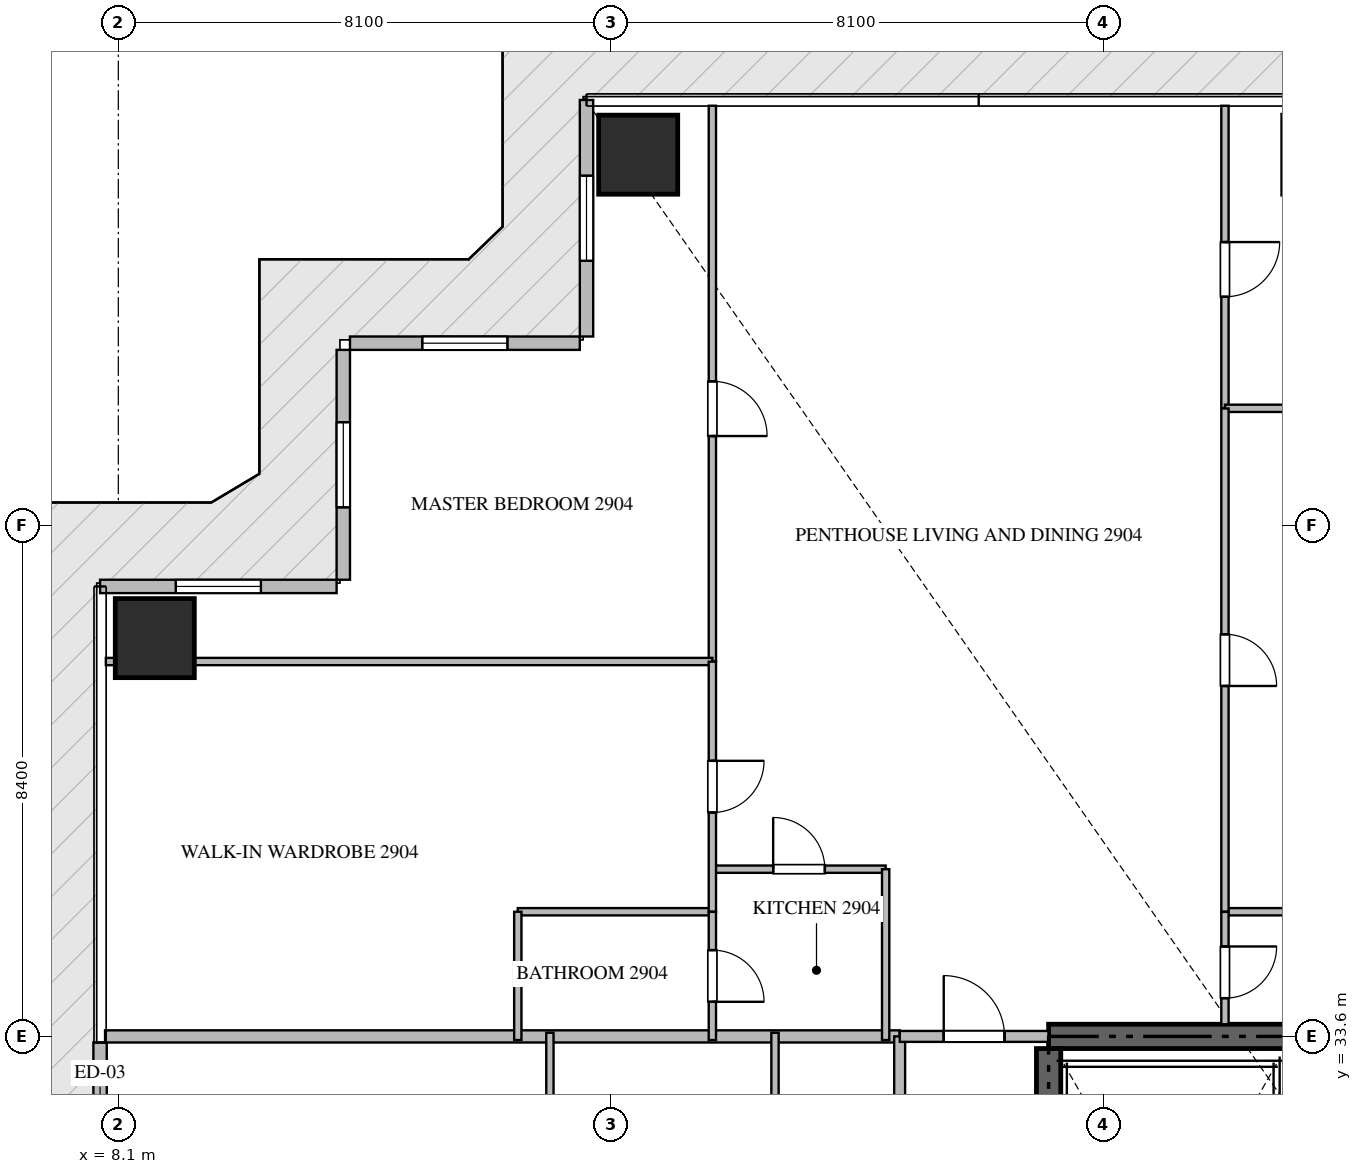
"""IFC4 building model, lengths in metres.
Left out: names, types, materials, properties, quantities, classifications, styles, units other than length and angle.
Written with IfcOpenShell. Run it as: python <this file> out.ifc"""

import sys

from ifc_helpers import new_model, si_unit, direction, frame, frame_2d, origin, origin_2d, place, context, subcontext, project, spatial, rectangle, extrude, source, transform, mapped, element, fill, save


model = new_model("IFC4")
c1 = context("Model", 3, precision=1e-05, world=origin(), true_north=direction((0.0, 1.0)))
c2 = subcontext(c1, "Body", "Model", "MODEL_VIEW")
j1 = project(units=[si_unit("LENGTHUNIT", "METRE"), si_unit("PLANEANGLEUNIT", "RADIAN")], contexts=[c1])
p1 = place(None, origin())
s1 = spatial("IfcSite", under=j1, at=p1, CompositionType="ELEMENT")
p2 = place(p1, origin())
s2 = spatial("IfcBuilding", under=s1, at=p2, CompositionType="ELEMENT")
p3 = place(p2, frame((0.0, 0.0, 120.15)))
s3 = spatial("IfcBuildingStorey", under=s2, at=p3, CompositionType="ELEMENT", Elevation=120.15)
p4 = place(p3, frame((41.4, 33.6, -0.44), z_axis=(0.0, 0.0, 1.0), x_axis=(-1.0, 0.0, 0.0)))
e1 = element("IfcWall", 1, at=p4, inside=s3, PredefinedType="SHEAR", context=c2, shape_type="SweptSolid", body=[
    extrude(rectangle(XDim=18.0, YDim=0.4, at=frame_2d((9.0, 0.0))), origin(), (0.0, 0.0, 1.0), 3.928),
])
p5 = place(p3, frame((23.4, 24.25, -0.44), z_axis=(0.0, 0.0, 1.0), x_axis=(0.0, 1.0, 0.0)))
e2 = element("IfcWall", 2, at=p5, inside=s3, PredefinedType="SHEAR", context=c2, shape_type="SweptSolid", body=[
    extrude(rectangle(XDim=9.15, YDim=0.4, at=frame_2d((4.575, 0.0))), origin(), (0.0, 0.0, 1.0), 3.928),
])
m1 = source(origin(), c2, "Body", "SweptSolid", [
    extrude(rectangle(XDim=1.3, YDim=1.3, at=origin_2d()), origin(), (0.0, 0.0, 1.0), 3.93),
])
for number, where, z_axis, x_axis in (
    (3, (16.65, 48.1, -0.44), (0.0, 0.0, 1.0), (1.0, 0.0, 0.0)),
    (4, (8.7, 40.15, -0.44), (0.0, 0.0, 1.0), (1.0, 0.0, 0.0)),
):
    element("IfcColumn", number, at=place(p3, frame(where, z_axis=z_axis, x_axis=x_axis)), inside=s3, PredefinedType="COLUMN", context=c2, shape_type="MappedRepresentation", body=[
        mapped(m1, transform((0.0, 0.0, 0.0), scale=1.0)),
    ])
p6 = place(p3, frame((15.8, 49.0, 0.0), z_axis=(0.0, 0.0, 1.0), x_axis=(0.0, -1.0, 0.0)))
e5 = element("IfcWall", 5, at=p6, inside=s3, PredefinedType="ELEMENTEDWALL", context=c2, shape_type="SweptSolid", body=[
    extrude(rectangle(XDim=3.89, YDim=0.22, at=frame_2d((1.945, 0.0))), origin(), (0.0, 0.0, 1.0), 3.475),
])
p7 = place(p6, frame((1.245, 0.0, 0.65)))
e6 = element("IfcOpeningElement", 6, at=p7, cuts=e5, PredefinedType="OPENING", context=c2, shape_type="SweptSolid", body=[
    extrude(rectangle(XDim=1.4, YDim=2.05, at=frame_2d((0.7, 1.025))), frame((0.0, 0.12, 0.0), z_axis=(0.0, -1.0, 0.0), x_axis=(1.0, 0.0, 0.0)), (0.0, 0.0, 1.0), 0.24),
])
p8 = place(p3, frame((15.69, 45.0, 0.0), z_axis=(0.0, 0.0, 1.0), x_axis=(-1.0, 0.0, 0.0)))
e7 = element("IfcWall", 7, at=p8, inside=s3, PredefinedType="ELEMENTEDWALL", context=c2, shape_type="SweptSolid", body=[
    extrude(rectangle(XDim=3.78, YDim=0.22, at=frame_2d((1.89, 0.0))), origin(), (0.0, 0.0, 1.0), 3.475),
])
p9 = place(p8, frame((1.19, 0.0, 0.65)))
e8 = element("IfcOpeningElement", 8, at=p9, cuts=e7, PredefinedType="OPENING", context=c2, shape_type="SweptSolid", body=[
    extrude(rectangle(XDim=1.4, YDim=2.05, at=frame_2d((0.7, 1.025))), frame((0.0, 0.12, 0.0), z_axis=(0.0, -1.0, 0.0), x_axis=(1.0, 0.0, 0.0)), (0.0, 0.0, 1.0), 0.24),
])
p10 = place(p3, frame((11.8, 44.89, 0.0), z_axis=(0.0, 0.0, 1.0), x_axis=(0.0, -1.0, 0.0)))
e9 = element("IfcWall", 9, at=p10, inside=s3, PredefinedType="ELEMENTEDWALL", context=c2, shape_type="SweptSolid", body=[
    extrude(rectangle(XDim=3.78, YDim=0.22, at=frame_2d((1.89, 0.0))), origin(), (0.0, 0.0, 1.0), 3.475),
])
p11 = place(p10, frame((1.19, 0.0, 0.65)))
e10 = element("IfcOpeningElement", 10, at=p11, cuts=e9, PredefinedType="OPENING", context=c2, shape_type="SweptSolid", body=[
    extrude(rectangle(XDim=1.4, YDim=2.05, at=frame_2d((0.7, 1.025))), frame((0.0, 0.12, 0.0), z_axis=(0.0, -1.0, 0.0), x_axis=(1.0, 0.0, 0.0)), (0.0, 0.0, 1.0), 0.24),
])
p12 = place(p3, frame((11.69, 41.0, 0.0), z_axis=(0.0, 0.0, 1.0), x_axis=(-1.0, 0.0, 0.0)))
e11 = element("IfcWall", 11, at=p12, inside=s3, PredefinedType="ELEMENTEDWALL", context=c2, shape_type="SweptSolid", body=[
    extrude(rectangle(XDim=3.89, YDim=0.22, at=frame_2d((1.945, 0.0))), origin(), (0.0, 0.0, 1.0), 3.475),
])
p13 = place(p12, frame((1.245, 0.0, 0.65)))
e12 = element("IfcOpeningElement", 12, at=p13, cuts=e11, PredefinedType="OPENING", context=c2, shape_type="SweptSolid", body=[
    extrude(rectangle(XDim=1.4, YDim=2.05, at=frame_2d((0.7, 1.025))), frame((0.0, 0.12, 0.0), z_axis=(0.0, -1.0, 0.0), x_axis=(1.0, 0.0, 0.0)), (0.0, 0.0, 1.0), 0.24),
])
p14 = place(p3, frame((7.8, 33.5, 0.0), z_axis=(0.0, 0.0, 1.0), x_axis=(0.0, -1.0, 0.0)))
e13 = element("IfcWall", 13, at=p14, inside=s3, PredefinedType="ELEMENTEDWALL", context=c2, shape_type="SweptSolid", body=[
    extrude(rectangle(XDim=3.0, YDim=0.22, at=frame_2d((1.5, 0.0))), origin(), (0.0, 0.0, 1.0), 3.475),
])
p15 = place(p14, frame((0.95, 0.0, 0.0)))
e14 = element("IfcOpeningElement", 14, at=p15, cuts=e13, PredefinedType="OPENING", context=c2, shape_type="SweptSolid", body=[
    extrude(rectangle(XDim=1.1, YDim=2.2, at=frame_2d((0.55, 1.1))), frame((0.0, 0.12, 0.0), z_axis=(0.0, -1.0, 0.0), x_axis=(1.0, 0.0, 0.0)), (0.0, 0.0, 1.0), 0.24),
])
p16 = place(p3, frame((7.882, 33.6, 0.0), z_axis=(0.0, 0.0, 1.0), x_axis=(1.0, 0.0, 0.0)))
e15 = element("IfcWall", 15, at=p16, inside=s3, PredefinedType="PARTITIONING", context=c2, shape_type="SweptSolid", body=[
    extrude(rectangle(XDim=13.068, YDim=0.2, at=frame_2d((6.534, 0.0))), origin(), (0.0, 0.0, 1.0), 3.49),
])
p17 = place(p3, frame((20.95, 14.9, 0.0), z_axis=(0.0, 0.0, 1.0), x_axis=(0.0, 1.0, 0.0)))
e16 = element("IfcWall", 16, at=p17, inside=s3, PredefinedType="PARTITIONING", context=c2, shape_type="SweptSolid", body=[
    extrude(rectangle(XDim=18.7, YDim=0.18, at=frame_2d((9.35, 0.0))), origin(), (0.0, 0.0, 1.0), 3.49),
])
p18 = place(p17, frame((1.805, 0.0, 0.0)))
e17 = element("IfcOpeningElement", 17, at=p18, cuts=e16, PredefinedType="OPENING", context=c2, shape_type="SweptSolid", body=[
    extrude(rectangle(XDim=1.0, YDim=2.15, at=frame_2d((0.5, 1.075))), frame((0.0, 0.1, 0.0), z_axis=(0.0, -1.0, 0.0), x_axis=(1.0, 0.0, 0.0)), (0.0, 0.0, 1.0), 0.2),
])
p19 = place(p17, frame((10.602, 0.0, 0.0)))
e18 = element("IfcOpeningElement", 18, at=p19, cuts=e16, PredefinedType="OPENING", context=c2, shape_type="SweptSolid", body=[
    extrude(rectangle(XDim=1.0, YDim=2.15, at=frame_2d((0.5, 1.075))), frame((0.0, 0.1, 0.0), z_axis=(0.0, -1.0, 0.0), x_axis=(1.0, 0.0, 0.0)), (0.0, 0.0, 1.0), 0.2),
])
p20 = place(p3, frame((20.952, 33.6, 0.0), z_axis=(0.0, 0.0, 1.0), x_axis=(1.0, 0.0, 0.0)))
e19 = element("IfcWall", 19, at=p20, inside=s3, PredefinedType="PARTITIONING", context=c2, shape_type="SweptSolid", body=[
    extrude(rectangle(XDim=2.446, YDim=0.18, at=frame_2d((1.223, 0.0))), origin(), (0.0, 0.0, 1.0), 3.49),
])
p21 = place(p20, frame((0.723, 0.0, 0.0)))
e20 = element("IfcOpeningElement", 20, at=p21, cuts=e19, PredefinedType="OPENING", context=c2, shape_type="SweptSolid", body=[
    extrude(rectangle(XDim=1.0, YDim=2.15, at=frame_2d((0.5, 1.075))), frame((0.0, 0.1, 0.0), z_axis=(0.0, -1.0, 0.0), x_axis=(1.0, 0.0, 0.0)), (0.0, 0.0, 1.0), 0.2),
])
p22 = place(p3, frame((17.87, 36.35, 0.0), z_axis=(0.0, 0.0, 1.0), x_axis=(1.0, 0.0, 0.0)))
e21 = element("IfcWall", 21, at=p22, inside=s3, PredefinedType="PARTITIONING", context=c2, shape_type="SweptSolid", body=[
    extrude(rectangle(XDim=2.85, YDim=0.12, at=frame_2d((1.425, 0.0))), origin(), (0.0, 0.0, 1.0), 3.49),
])
p23 = place(p22, frame((1.0, 0.0, 0.0)))
e22 = element("IfcOpeningElement", 22, at=p23, cuts=e21, PredefinedType="OPENING", context=c2, shape_type="SweptSolid", body=[
    extrude(rectangle(XDim=0.85, YDim=2.1, at=frame_2d((0.425, 1.05))), frame((0.0, 0.07, 0.0), z_axis=(0.0, -1.0, 0.0), x_axis=(1.0, 0.0, 0.0)), (0.0, 0.0, 1.0), 0.14),
])
p24 = place(p3, frame((20.72, 36.35, 0.0), z_axis=(0.0, 0.0, 1.0), x_axis=(0.0, -1.0, 0.0)))
e23 = element("IfcWall", 23, at=p24, inside=s3, PredefinedType="PARTITIONING", context=c2, shape_type="SweptSolid", body=[
    extrude(rectangle(XDim=2.81, YDim=0.12, at=frame_2d((1.405, 0.0))), origin(), (0.0, 0.0, 1.0), 3.49),
])
p25 = place(p3, frame((17.87, 48.905, 0.0), z_axis=(0.0, 0.0, 1.0), x_axis=(0.0, -1.0, 0.0)))
e24 = element("IfcWall", 24, at=p25, inside=s3, PredefinedType="PARTITIONING", context=c2, shape_type="SweptSolid", body=[
    extrude(rectangle(XDim=9.14, YDim=0.12, at=frame_2d((4.57, 0.0))), origin(), (0.0, 0.0, 1.0), 3.49),
])
p26 = place(p25, frame((4.532, 0.0, 0.0)))
e25 = element("IfcOpeningElement", 25, at=p26, cuts=e24, PredefinedType="OPENING", context=c2, shape_type="SweptSolid", body=[
    extrude(rectangle(XDim=0.9, YDim=2.1, at=frame_2d((0.45, 1.05))), frame((0.0, 0.07, 0.0), z_axis=(0.0, -1.0, 0.0), x_axis=(1.0, 0.0, 0.0)), (0.0, 0.0, 1.0), 0.14),
])
p27 = place(p3, frame((7.895, 39.765, 0.0), z_axis=(0.0, 0.0, 1.0), x_axis=(1.0, 0.0, 0.0)))
e26 = element("IfcWall", 26, at=p27, inside=s3, PredefinedType="PARTITIONING", context=c2, shape_type="SweptSolid", body=[
    extrude(rectangle(XDim=9.975, YDim=0.12, at=frame_2d((4.988, 0.0))), origin(), (0.0, 0.0, 1.0), 3.49),
])
p28 = place(p3, frame((14.67, 35.65, 0.0), z_axis=(0.0, 0.0, 1.0), x_axis=(1.0, 0.0, 0.0)))
e27 = element("IfcWall", 27, at=p28, inside=s3, PredefinedType="PARTITIONING", context=c2, shape_type="SweptSolid", body=[
    extrude(rectangle(XDim=3.2, YDim=0.12, at=frame_2d((1.6, 0.0))), origin(), (0.0, 0.0, 1.0), 3.49),
])
p29 = place(p3, frame((14.67, 35.65, 0.0), z_axis=(0.0, 0.0, 1.0), x_axis=(0.0, -1.0, 0.0)))
e28 = element("IfcWall", 28, at=p29, inside=s3, PredefinedType="PARTITIONING", context=c2, shape_type="SweptSolid", body=[
    extrude(rectangle(XDim=2.11, YDim=0.12, at=frame_2d((1.055, 0.0))), origin(), (0.0, 0.0, 1.0), 3.49),
])
p30 = place(p3, frame((17.87, 39.763, 0.0), z_axis=(0.0, 0.0, 1.0), x_axis=(0.0, -1.0, 0.0)))
e29 = element("IfcWall", 29, at=p30, inside=s3, PredefinedType="PARTITIONING", context=c2, shape_type="SweptSolid", body=[
    extrude(rectangle(XDim=4.113, YDim=0.12, at=frame_2d((2.057, 0.0))), origin(), (0.0, 0.0, 1.0), 3.49),
])
p31 = place(p30, frame((1.631, 0.0, 0.0)))
e30 = element("IfcOpeningElement", 30, at=p31, cuts=e29, PredefinedType="OPENING", context=c2, shape_type="SweptSolid", body=[
    extrude(rectangle(XDim=0.85, YDim=2.1, at=frame_2d((0.425, 1.05))), frame((0.0, 0.07, 0.0), z_axis=(0.0, -1.0, 0.0), x_axis=(1.0, 0.0, 0.0)), (0.0, 0.0, 1.0), 0.14),
])
p32 = place(p3, frame((17.87, 35.648, 0.0), z_axis=(0.0, 0.0, 1.0), x_axis=(0.0, -1.0, 0.0)))
e31 = element("IfcWall", 31, at=p32, inside=s3, PredefinedType="PARTITIONING", context=c2, shape_type="SweptSolid", body=[
    extrude(rectangle(XDim=2.108, YDim=0.12, at=frame_2d((1.054, 0.0))), origin(), (0.0, 0.0, 1.0), 3.49),
])
p33 = place(p32, frame((0.629, 0.0, 0.0)))
e32 = element("IfcOpeningElement", 32, at=p33, cuts=e31, PredefinedType="OPENING", context=c2, shape_type="SweptSolid", body=[
    extrude(rectangle(XDim=0.85, YDim=2.1, at=frame_2d((0.425, 1.05))), frame((0.0, 0.07, 0.0), z_axis=(0.0, -1.0, 0.0), x_axis=(1.0, 0.0, 0.0)), (0.0, 0.0, 1.0), 0.14),
])
p34 = place(p3, frame((26.3, 48.905, 0.0), z_axis=(0.0, 0.0, 1.0), x_axis=(0.0, -1.0, 0.0)))
e33 = element("IfcWall", 33, at=p34, inside=s3, PredefinedType="PARTITIONING", context=c2, shape_type="SweptSolid", body=[
    extrude(rectangle(XDim=4.976, YDim=0.12, at=frame_2d((2.488, 0.0))), origin(), (0.0, 0.0, 1.0), 3.49),
])
p35 = place(p34, frame((2.242, 0.0, 0.0)))
e34 = element("IfcOpeningElement", 34, at=p35, cuts=e33, PredefinedType="OPENING", context=c2, shape_type="SweptSolid", body=[
    extrude(rectangle(XDim=0.9, YDim=2.1, at=frame_2d((0.45, 1.05))), frame((0.0, 0.07, 0.0), z_axis=(0.0, -1.0, 0.0), x_axis=(1.0, 0.0, 0.0)), (0.0, 0.0, 1.0), 0.14),
])
for number, where, z_axis, x_axis in (
    (35, (26.3, 43.929, 0.0), (0.0, 0.0, 1.0), (1.0, 0.0, 0.0)),
    (36, (26.3, 35.65, 0.0), (0.0, 0.0, 1.0), (1.0, 0.0, 0.0)),
):
    element("IfcWall", number, at=place(p3, frame(where, z_axis=z_axis, x_axis=x_axis)), inside=s3, PredefinedType="PARTITIONING", context=c2, shape_type="SweptSolid", body=[
        extrude(rectangle(XDim=6.16, YDim=0.12, at=frame_2d((3.08, 0.0))), origin(), (0.0, 0.0, 1.0), 3.49),
    ])
p36 = place(p3, frame((26.3, 43.927, 0.0), z_axis=(0.0, 0.0, 1.0), x_axis=(0.0, -1.0, 0.0)))
e37 = element("IfcWall", 37, at=p36, inside=s3, PredefinedType="PARTITIONING", context=c2, shape_type="SweptSolid", body=[
    extrude(rectangle(XDim=8.277, YDim=0.12, at=frame_2d((4.139, 0.0))), origin(), (0.0, 0.0, 1.0), 3.49),
])
p37 = place(p36, frame((3.714, 0.0, 0.0)))
e38 = element("IfcOpeningElement", 38, at=p37, cuts=e37, PredefinedType="OPENING", context=c2, shape_type="SweptSolid", body=[
    extrude(rectangle(XDim=0.85, YDim=2.1, at=frame_2d((0.425, 1.05))), frame((0.0, 0.07, 0.0), z_axis=(0.0, -1.0, 0.0), x_axis=(1.0, 0.0, 0.0)), (0.0, 0.0, 1.0), 0.14),
])
p38 = place(p3, frame((26.3, 35.648, 0.0), z_axis=(0.0, 0.0, 1.0), x_axis=(0.0, -1.0, 0.0)))
e39 = element("IfcWall", 39, at=p38, inside=s3, PredefinedType="PARTITIONING", context=c2, shape_type="SweptSolid", body=[
    extrude(rectangle(XDim=1.848, YDim=0.12, at=frame_2d((0.924, 0.0))), origin(), (0.0, 0.0, 1.0), 3.49),
])
p39 = place(p38, frame((0.569, 0.0, 0.0)))
e40 = element("IfcOpeningElement", 40, at=p39, cuts=e39, PredefinedType="OPENING", context=c2, shape_type="SweptSolid", body=[
    extrude(rectangle(XDim=0.85, YDim=2.1, at=frame_2d((0.425, 1.05))), frame((0.0, 0.07, 0.0), z_axis=(0.0, -1.0, 0.0), x_axis=(1.0, 0.0, 0.0)), (0.0, 0.0, 1.0), 0.14),
])
for number, where, z_axis, x_axis in (
    (41, (15.198, 27.8, 0.0), (0.0, 0.0, 1.0), (0.0, 1.0, 0.0)),
    (42, (18.9, 27.8, 0.0), (0.0, 0.0, 1.0), (0.0, 1.0, 0.0)),
):
    element("IfcWall", number, at=place(p3, frame(where, z_axis=z_axis, x_axis=x_axis)), inside=s3, PredefinedType="PARTITIONING", context=c2, shape_type="SweptSolid", body=[
        extrude(rectangle(XDim=5.86, YDim=0.12, at=frame_2d((2.93, 0.0))), origin(), (0.0, 0.0, 1.0), 3.49),
    ])
m2 = source(origin(), c2, "Body", "SweptSolid", [
    extrude(rectangle(XDim=1.4, YDim=2.05, at=frame_2d((0.7, 1.025))), frame((0.0, 0.03, 0.0), z_axis=(0.0, -1.0, 0.0), x_axis=(1.0, 0.0, 0.0)), (0.0, 0.0, 1.0), 0.06),
])
p40 = place(p7, origin())
e43 = element("IfcWindow", 43, at=p40, inside=s3, PartitioningType="SINGLE_PANEL", PredefinedType="WINDOW", context=c2, shape_type="MappedRepresentation", body=[
    mapped(m2, transform((0.0, 0.0, 0.0), scale=1.0)),
])
fill(e6, e43)
p41 = place(p9, origin())
e44 = element("IfcWindow", 44, at=p41, inside=s3, PartitioningType="SINGLE_PANEL", PredefinedType="WINDOW", context=c2, shape_type="MappedRepresentation", body=[
    mapped(m2, transform((0.0, 0.0, 0.0), scale=1.0)),
])
fill(e8, e44)
p42 = place(p11, origin())
e45 = element("IfcWindow", 45, at=p42, inside=s3, PartitioningType="SINGLE_PANEL", PredefinedType="WINDOW", context=c2, shape_type="MappedRepresentation", body=[
    mapped(m2, transform((0.0, 0.0, 0.0), scale=1.0)),
])
fill(e10, e45)
p43 = place(p13, origin())
e46 = element("IfcWindow", 46, at=p43, inside=s3, PartitioningType="SINGLE_PANEL", PredefinedType="WINDOW", context=c2, shape_type="MappedRepresentation", body=[
    mapped(m2, transform((0.0, 0.0, 0.0), scale=1.0)),
])
fill(e12, e46)
m3 = source(origin(), c2, "Body", "SweptSolid", [
    extrude(rectangle(XDim=1.0, YDim=2.15, at=frame_2d((0.5, 1.075))), frame((0.0, 0.025, 0.0), z_axis=(0.0, -1.0, 0.0), x_axis=(1.0, 0.0, 0.0)), (0.0, 0.0, 1.0), 0.05),
])
p44 = place(p21, origin())
e47 = element("IfcDoor", 47, at=p44, inside=s3, OperationType="SINGLE_SWING_LEFT", PredefinedType="DOOR", context=c2, shape_type="MappedRepresentation", body=[
    mapped(m3, transform((0.0, 0.0, 0.0), scale=1.0)),
])
fill(e20, e47)
m4 = source(origin(), c2, "Body", "SweptSolid", [
    extrude(rectangle(XDim=0.85, YDim=2.1, at=frame_2d((0.425, 1.05))), frame((0.0, 0.025, 0.0), z_axis=(0.0, -1.0, 0.0), x_axis=(1.0, 0.0, 0.0)), (0.0, 0.0, 1.0), 0.05),
])
p45 = place(p23, origin())
e48 = element("IfcDoor", 48, at=p45, inside=s3, OperationType="SINGLE_SWING_LEFT", PredefinedType="DOOR", context=c2, shape_type="MappedRepresentation", body=[
    mapped(m4, transform((0.0, 0.0, 0.0), scale=1.0)),
])
fill(e22, e48)
m5 = source(origin(), c2, "Body", "SweptSolid", [
    extrude(rectangle(XDim=0.9, YDim=2.1, at=frame_2d((0.45, 1.05))), frame((0.0, 0.025, 0.0), z_axis=(0.0, -1.0, 0.0), x_axis=(1.0, 0.0, 0.0)), (0.0, 0.0, 1.0), 0.05),
])
p46 = place(p26, origin())
e49 = element("IfcDoor", 49, at=p46, inside=s3, OperationType="SINGLE_SWING_RIGHT", PredefinedType="DOOR", context=c2, shape_type="MappedRepresentation", body=[
    mapped(m5, transform((0.0, 0.0, 0.0), scale=1.0)),
])
fill(e25, e49)
p47 = place(p31, origin())
e50 = element("IfcDoor", 50, at=p47, inside=s3, OperationType="SINGLE_SWING_LEFT", PredefinedType="DOOR", context=c2, shape_type="MappedRepresentation", body=[
    mapped(m4, transform((0.0, 0.0, 0.0), scale=1.0)),
])
fill(e30, e50)
p48 = place(p33, origin())
e51 = element("IfcDoor", 51, at=p48, inside=s3, OperationType="SINGLE_SWING_RIGHT", PredefinedType="DOOR", context=c2, shape_type="MappedRepresentation", body=[
    mapped(m4, transform((0.0, 0.0, 0.0), scale=1.0)),
])
fill(e32, e51)
p49 = place(p35, origin())
e52 = element("IfcDoor", 52, at=p49, inside=s3, OperationType="SINGLE_SWING_LEFT", PredefinedType="DOOR", context=c2, shape_type="MappedRepresentation", body=[
    mapped(m5, transform((0.0, 0.0, 0.0), scale=1.0)),
])
fill(e34, e52)
p50 = place(p37, origin())
e53 = element("IfcDoor", 53, at=p50, inside=s3, OperationType="SINGLE_SWING_RIGHT", PredefinedType="DOOR", context=c2, shape_type="MappedRepresentation", body=[
    mapped(m4, transform((0.0, 0.0, 0.0), scale=1.0)),
])
fill(e38, e53)
p51 = place(p39, origin())
e54 = element("IfcDoor", 54, at=p51, inside=s3, OperationType="SINGLE_SWING_LEFT", PredefinedType="DOOR", context=c2, shape_type="MappedRepresentation", body=[
    mapped(m4, transform((0.0, 0.0, 0.0), scale=1.0)),
])
fill(e40, e54)
save(model, sys.argv[1])
